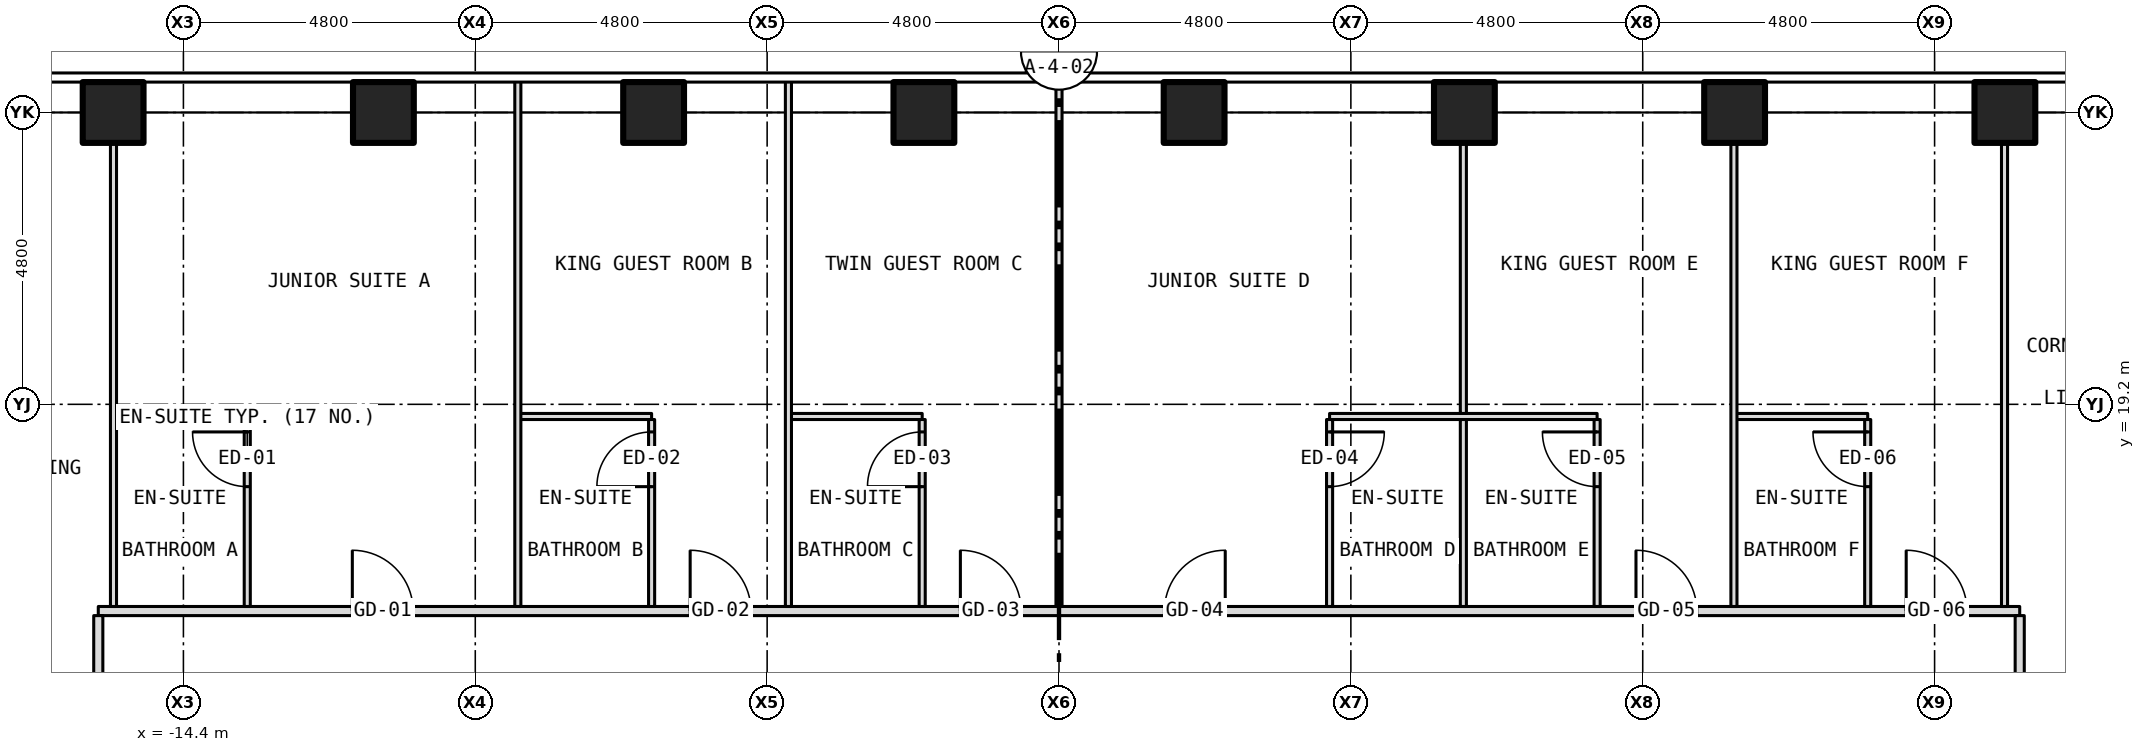
"""IFC4 building model, lengths in metres.
Left out: names, types, materials, properties, quantities, classifications, styles, units other than length and angle.
Written with IfcOpenShell. Run it as: python <this file> out.ifc"""

import sys

from ifc_helpers import new_model, si_unit, direction, frame, frame_2d, origin, origin_2d, place, context, subcontext, project, spatial, rectangle, hollow_rectangle, extrude, element, fill, save


model = new_model("IFC4")
c1 = context("Model", 3, precision=1e-05, world=origin(), true_north=direction((0.0, 1.0)))
c2 = subcontext(c1, "Body", "Model", "MODEL_VIEW")
j1 = project(units=[si_unit("LENGTHUNIT", "METRE"), si_unit("PLANEANGLEUNIT", "RADIAN")], contexts=[c1])
p1 = place(None, origin())
s1 = spatial("IfcSite", under=j1, at=p1, CompositionType="ELEMENT")
p2 = place(p1, origin())
s2 = spatial("IfcBuilding", under=s1, at=p2, CompositionType="ELEMENT")
p3 = place(p2, frame((0.0, 0.0, 53.0)))
s3 = spatial("IfcBuildingStorey", under=s2, at=p3, CompositionType="ELEMENT", Elevation=53.0)
for number, where, z_axis, x_axis in (
    (1, (-15.556, 24.0, -0.15), (0.0, 0.0, 1.0), (1.0, 0.0, 0.0)),
    (2, (-11.111, 24.0, -0.15), (0.0, 0.0, 1.0), (1.0, 0.0, 0.0)),
    (3, (-6.667, 24.0, -0.15), (0.0, 0.0, 1.0), (1.0, 0.0, 0.0)),
    (4, (-2.222, 24.0, -0.15), (0.0, 0.0, 1.0), (1.0, 0.0, 0.0)),
    (5, (2.222, 24.0, -0.15), (0.0, 0.0, 1.0), (1.0, 0.0, 0.0)),
    (6, (6.667, 24.0, -0.15), (0.0, 0.0, 1.0), (1.0, 0.0, 0.0)),
    (7, (11.111, 24.0, -0.15), (0.0, 0.0, 1.0), (1.0, 0.0, 0.0)),
    (8, (15.556, 24.0, -0.15), (0.0, 0.0, 1.0), (1.0, 0.0, 0.0)),
):
    element("IfcColumn", number, at=place(p3, frame(where, z_axis=z_axis, x_axis=x_axis)), inside=s3, PredefinedType="COLUMN", context=c2, shape_type="SweptSolid", body=[
        extrude(hollow_rectangle(XDim=1.0, YDim=1.0, WallThickness=0.06, at=origin_2d()), origin(), (0.0, 0.0, 1.0), 3.5),
    ])
p4 = place(p3, frame((-15.8, 15.8, 0.0), z_axis=(0.0, 0.0, 1.0), x_axis=(1.0, 0.0, 0.0)))
e9 = element("IfcWall", 9, at=p4, inside=s3, PredefinedType="PARTITIONING", context=c2, shape_type="SweptSolid", body=[
    extrude(rectangle(XDim=31.6, YDim=0.15, at=frame_2d((15.8, 0.0))), origin(), (0.0, 0.0, 1.0), 3.35),
])
p5 = place(p4, frame((4.178, 0.0, 0.0)))
e10 = element("IfcOpeningElement", 10, at=p5, cuts=e9, PredefinedType="OPENING", context=c2, shape_type="SweptSolid", body=[
    extrude(rectangle(XDim=1.0, YDim=2.1, at=frame_2d((0.5, 1.05))), frame((0.0, 0.087, 0.0), z_axis=(0.0, -1.0, 0.0), x_axis=(1.0, 0.0, 0.0)), (0.0, 0.0, 1.0), 0.174),
])
p6 = place(p4, frame((9.734, 0.0, 0.0)))
e11 = element("IfcOpeningElement", 11, at=p6, cuts=e9, PredefinedType="OPENING", context=c2, shape_type="SweptSolid", body=[
    extrude(rectangle(XDim=1.0, YDim=2.1, at=frame_2d((0.5, 1.05))), frame((0.0, 0.087, 0.0), z_axis=(0.0, -1.0, 0.0), x_axis=(1.0, 0.0, 0.0)), (0.0, 0.0, 1.0), 0.174),
])
p7 = place(p4, frame((14.178, 0.0, 0.0)))
e12 = element("IfcOpeningElement", 12, at=p7, cuts=e9, PredefinedType="OPENING", context=c2, shape_type="SweptSolid", body=[
    extrude(rectangle(XDim=1.0, YDim=2.1, at=frame_2d((0.5, 1.05))), frame((0.0, 0.087, 0.0), z_axis=(0.0, -1.0, 0.0), x_axis=(1.0, 0.0, 0.0)), (0.0, 0.0, 1.0), 0.174),
])
p8 = place(p4, frame((17.534, 0.0, 0.0)))
e13 = element("IfcOpeningElement", 13, at=p8, cuts=e9, PredefinedType="OPENING", context=c2, shape_type="SweptSolid", body=[
    extrude(rectangle(XDim=1.0, YDim=2.1, at=frame_2d((0.5, 1.05))), frame((0.0, 0.087, 0.0), z_axis=(0.0, -1.0, 0.0), x_axis=(1.0, 0.0, 0.0)), (0.0, 0.0, 1.0), 0.174),
])
p9 = place(p4, frame((25.289, 0.0, 0.0)))
e14 = element("IfcOpeningElement", 14, at=p9, cuts=e9, PredefinedType="OPENING", context=c2, shape_type="SweptSolid", body=[
    extrude(rectangle(XDim=1.0, YDim=2.1, at=frame_2d((0.5, 1.05))), frame((0.0, 0.087, 0.0), z_axis=(0.0, -1.0, 0.0), x_axis=(1.0, 0.0, 0.0)), (0.0, 0.0, 1.0), 0.174),
])
p10 = place(p4, frame((29.733, 0.0, 0.0)))
e15 = element("IfcOpeningElement", 15, at=p10, cuts=e9, PredefinedType="OPENING", context=c2, shape_type="SweptSolid", body=[
    extrude(rectangle(XDim=1.0, YDim=2.1, at=frame_2d((0.5, 1.05))), frame((0.0, 0.087, 0.0), z_axis=(0.0, -1.0, 0.0), x_axis=(1.0, 0.0, 0.0)), (0.0, 0.0, 1.0), 0.174),
])
for number, where, z_axis, x_axis in (
    (16, (-15.55, 19.0, 0.0), (0.0, 0.0, 1.0), (1.0, 0.0, 0.0)),
    (17, (-8.9, 19.0, 0.0), (0.0, 0.0, 1.0), (1.0, 0.0, 0.0)),
    (18, (-4.45, 19.0, 0.0), (0.0, 0.0, 1.0), (1.0, 0.0, 0.0)),
):
    element("IfcWall", number, at=place(p3, frame(where, z_axis=z_axis, x_axis=x_axis)), inside=s3, PredefinedType="PARTITIONING", context=c2, shape_type="SweptSolid", body=[
        extrude(rectangle(XDim=2.2, YDim=0.1, at=frame_2d((1.1, 0.0))), origin(), (0.0, 0.0, 1.0), 3.35),
    ])
p11 = place(p3, frame((4.45, 19.0, 0.0), z_axis=(0.0, 0.0, 1.0), x_axis=(1.0, 0.0, 0.0)))
e19 = element("IfcWall", 19, at=p11, inside=s3, PredefinedType="PARTITIONING", context=c2, shape_type="SweptSolid", body=[
    extrude(rectangle(XDim=4.4, YDim=0.1, at=frame_2d((2.2, 0.0))), origin(), (0.0, 0.0, 1.0), 3.35),
])
p12 = place(p3, frame((11.1, 19.0, 0.0), z_axis=(0.0, 0.0, 1.0), x_axis=(1.0, 0.0, 0.0)))
e20 = element("IfcWall", 20, at=p12, inside=s3, PredefinedType="PARTITIONING", context=c2, shape_type="SweptSolid", body=[
    extrude(rectangle(XDim=2.2, YDim=0.1, at=frame_2d((1.1, 0.0))), origin(), (0.0, 0.0, 1.0), 3.35),
])
p13 = place(p3, frame((-15.8, 10.92, 0.0), z_axis=(0.0, 0.0, 1.0), x_axis=(0.0, 1.0, 0.0)))
e21 = element("IfcWall", 21, at=p13, inside=s3, PredefinedType="PARTITIONING", context=c2, shape_type="SweptSolid", body=[
    extrude(rectangle(XDim=4.805, YDim=0.15, at=frame_2d((2.403, 0.0))), origin(), (0.0, 0.0, 1.0), 3.35),
])
p14 = place(p13, frame((0.78, 0.0, 0.0)))
e22 = element("IfcOpeningElement", 22, at=p14, cuts=e21, PredefinedType="OPENING", context=c2, shape_type="SweptSolid", body=[
    extrude(rectangle(XDim=1.0, YDim=2.1, at=frame_2d((0.5, 1.05))), frame((0.0, 0.087, 0.0), z_axis=(0.0, -1.0, 0.0), x_axis=(1.0, 0.0, 0.0)), (0.0, 0.0, 1.0), 0.174),
])
p15 = place(p3, frame((-15.55, 15.875, 0.0), z_axis=(0.0, 0.0, 1.0), x_axis=(0.0, 1.0, 0.0)))
e23 = element("IfcWall", 23, at=p15, inside=s3, PredefinedType="PARTITIONING", context=c2, shape_type="SweptSolid", body=[
    extrude(rectangle(XDim=8.005, YDim=0.1, at=frame_2d((4.002, 0.0))), origin(), (0.0, 0.0, 1.0), 3.35),
])
p16 = place(p3, frame((-13.35, 15.875, 0.0), z_axis=(0.0, 0.0, 1.0), x_axis=(0.0, 1.0, 0.0)))
e24 = element("IfcWall", 24, at=p16, inside=s3, PredefinedType="PARTITIONING", context=c2, shape_type="SweptSolid", body=[
    extrude(rectangle(XDim=3.075, YDim=0.1, at=frame_2d((1.538, 0.0))), origin(), (0.0, 0.0, 1.0), 3.35),
])
p17 = place(p16, frame((1.971, 0.0, 0.0)))
e25 = element("IfcOpeningElement", 25, at=p17, cuts=e24, PredefinedType="OPENING", context=c2, shape_type="SweptSolid", body=[
    extrude(rectangle(XDim=0.9, YDim=2.1, at=frame_2d((0.45, 1.05))), frame((0.0, 0.062, 0.0), z_axis=(0.0, -1.0, 0.0), x_axis=(1.0, 0.0, 0.0)), (0.0, 0.0, 1.0), 0.124),
])
p18 = place(p3, frame((-8.9, 15.875, 0.0), z_axis=(0.0, 0.0, 1.0), x_axis=(0.0, 1.0, 0.0)))
e26 = element("IfcWall", 26, at=p18, inside=s3, PredefinedType="PARTITIONING", context=c2, shape_type="SweptSolid", body=[
    extrude(rectangle(XDim=8.655, YDim=0.1, at=frame_2d((4.328, 0.0))), origin(), (0.0, 0.0, 1.0), 3.35),
])
p19 = place(p3, frame((-6.7, 15.875, 0.0), z_axis=(0.0, 0.0, 1.0), x_axis=(0.0, 1.0, 0.0)))
e27 = element("IfcWall", 27, at=p19, inside=s3, PredefinedType="PARTITIONING", context=c2, shape_type="SweptSolid", body=[
    extrude(rectangle(XDim=3.075, YDim=0.1, at=frame_2d((1.538, 0.0))), origin(), (0.0, 0.0, 1.0), 3.35),
])
p20 = place(p19, frame((1.971, 0.0, 0.0)))
e28 = element("IfcOpeningElement", 28, at=p20, cuts=e27, PredefinedType="OPENING", context=c2, shape_type="SweptSolid", body=[
    extrude(rectangle(XDim=0.9, YDim=2.1, at=frame_2d((0.45, 1.05))), frame((0.0, 0.062, 0.0), z_axis=(0.0, -1.0, 0.0), x_axis=(1.0, 0.0, 0.0)), (0.0, 0.0, 1.0), 0.124),
])
p21 = place(p3, frame((-4.45, 15.875, 0.0), z_axis=(0.0, 0.0, 1.0), x_axis=(0.0, 1.0, 0.0)))
e29 = element("IfcWall", 29, at=p21, inside=s3, PredefinedType="PARTITIONING", context=c2, shape_type="SweptSolid", body=[
    extrude(rectangle(XDim=8.655, YDim=0.1, at=frame_2d((4.328, 0.0))), origin(), (0.0, 0.0, 1.0), 3.35),
])
p22 = place(p3, frame((-2.25, 15.875, 0.0), z_axis=(0.0, 0.0, 1.0), x_axis=(0.0, 1.0, 0.0)))
e30 = element("IfcWall", 30, at=p22, inside=s3, PredefinedType="PARTITIONING", context=c2, shape_type="SweptSolid", body=[
    extrude(rectangle(XDim=3.075, YDim=0.1, at=frame_2d((1.538, 0.0))), origin(), (0.0, 0.0, 1.0), 3.35),
])
p23 = place(p22, frame((1.971, 0.0, 0.0)))
e31 = element("IfcOpeningElement", 31, at=p23, cuts=e30, PredefinedType="OPENING", context=c2, shape_type="SweptSolid", body=[
    extrude(rectangle(XDim=0.9, YDim=2.1, at=frame_2d((0.45, 1.05))), frame((0.0, 0.062, 0.0), z_axis=(0.0, -1.0, 0.0), x_axis=(1.0, 0.0, 0.0)), (0.0, 0.0, 1.0), 0.124),
])
p24 = place(p3, frame((0.0, 15.875, 0.0), z_axis=(0.0, 0.0, 1.0), x_axis=(0.0, 1.0, 0.0)))
e32 = element("IfcWall", 32, at=p24, inside=s3, PredefinedType="PARTITIONING", context=c2, shape_type="SweptSolid", body=[
    extrude(rectangle(XDim=8.655, YDim=0.1, at=frame_2d((4.328, 0.0))), origin(), (0.0, 0.0, 1.0), 2.728),
])
p25 = place(p3, frame((4.45, 15.875, 0.0), z_axis=(0.0, 0.0, 1.0), x_axis=(0.0, 1.0, 0.0)))
e33 = element("IfcWall", 33, at=p25, inside=s3, PredefinedType="PARTITIONING", context=c2, shape_type="SweptSolid", body=[
    extrude(rectangle(XDim=3.075, YDim=0.1, at=frame_2d((1.538, 0.0))), origin(), (0.0, 0.0, 1.0), 3.35),
])
p26 = place(p25, frame((1.971, 0.0, 0.0)))
e34 = element("IfcOpeningElement", 34, at=p26, cuts=e33, PredefinedType="OPENING", context=c2, shape_type="SweptSolid", body=[
    extrude(rectangle(XDim=0.9, YDim=2.1, at=frame_2d((0.45, 1.05))), frame((0.0, 0.062, 0.0), z_axis=(0.0, -1.0, 0.0), x_axis=(1.0, 0.0, 0.0)), (0.0, 0.0, 1.0), 0.124),
])
p27 = place(p3, frame((6.65, 15.875, 0.0), z_axis=(0.0, 0.0, 1.0), x_axis=(0.0, 1.0, 0.0)))
e35 = element("IfcWall", 35, at=p27, inside=s3, PredefinedType="PARTITIONING", context=c2, shape_type="SweptSolid", body=[
    extrude(rectangle(XDim=3.075, YDim=0.1, at=frame_2d((1.538, 0.0))), origin(), (0.0, 0.0, 1.0), 3.35),
])
p28 = place(p3, frame((6.65, 19.05, 0.0), z_axis=(0.0, 0.0, 1.0), x_axis=(0.0, 1.0, 0.0)))
e36 = element("IfcWall", 36, at=p28, inside=s3, PredefinedType="PARTITIONING", context=c2, shape_type="SweptSolid", body=[
    extrude(rectangle(XDim=4.83, YDim=0.1, at=frame_2d((2.415, 0.0))), origin(), (0.0, 0.0, 1.0), 3.35),
])
p29 = place(p3, frame((8.85, 15.875, 0.0), z_axis=(0.0, 0.0, 1.0), x_axis=(0.0, 1.0, 0.0)))
e37 = element("IfcWall", 37, at=p29, inside=s3, PredefinedType="PARTITIONING", context=c2, shape_type="SweptSolid", body=[
    extrude(rectangle(XDim=3.075, YDim=0.1, at=frame_2d((1.538, 0.0))), origin(), (0.0, 0.0, 1.0), 3.35),
])
p30 = place(p29, frame((1.971, 0.0, 0.0)))
e38 = element("IfcOpeningElement", 38, at=p30, cuts=e37, PredefinedType="OPENING", context=c2, shape_type="SweptSolid", body=[
    extrude(rectangle(XDim=0.9, YDim=2.1, at=frame_2d((0.45, 1.05))), frame((0.0, 0.062, 0.0), z_axis=(0.0, -1.0, 0.0), x_axis=(1.0, 0.0, 0.0)), (0.0, 0.0, 1.0), 0.124),
])
p31 = place(p3, frame((11.1, 15.875, 0.0), z_axis=(0.0, 0.0, 1.0), x_axis=(0.0, 1.0, 0.0)))
e39 = element("IfcWall", 39, at=p31, inside=s3, PredefinedType="PARTITIONING", context=c2, shape_type="SweptSolid", body=[
    extrude(rectangle(XDim=8.005, YDim=0.1, at=frame_2d((4.002, 0.0))), origin(), (0.0, 0.0, 1.0), 3.35),
])
p32 = place(p3, frame((13.3, 15.875, 0.0), z_axis=(0.0, 0.0, 1.0), x_axis=(0.0, 1.0, 0.0)))
e40 = element("IfcWall", 40, at=p32, inside=s3, PredefinedType="PARTITIONING", context=c2, shape_type="SweptSolid", body=[
    extrude(rectangle(XDim=3.075, YDim=0.1, at=frame_2d((1.538, 0.0))), origin(), (0.0, 0.0, 1.0), 3.35),
])
p33 = place(p32, frame((1.971, 0.0, 0.0)))
e41 = element("IfcOpeningElement", 41, at=p33, cuts=e40, PredefinedType="OPENING", context=c2, shape_type="SweptSolid", body=[
    extrude(rectangle(XDim=0.9, YDim=2.1, at=frame_2d((0.45, 1.05))), frame((0.0, 0.062, 0.0), z_axis=(0.0, -1.0, 0.0), x_axis=(1.0, 0.0, 0.0)), (0.0, 0.0, 1.0), 0.124),
])
p34 = place(p3, frame((15.55, 15.875, 0.0), z_axis=(0.0, 0.0, 1.0), x_axis=(0.0, 1.0, 0.0)))
e42 = element("IfcWall", 42, at=p34, inside=s3, PredefinedType="PARTITIONING", context=c2, shape_type="SweptSolid", body=[
    extrude(rectangle(XDim=8.005, YDim=0.1, at=frame_2d((4.002, 0.0))), origin(), (0.0, 0.0, 1.0), 3.35),
])
p35 = place(p3, frame((15.8, 10.92, 0.0), z_axis=(0.0, 0.0, 1.0), x_axis=(0.0, 1.0, 0.0)))
e43 = element("IfcWall", 43, at=p35, inside=s3, PredefinedType="PARTITIONING", context=c2, shape_type="SweptSolid", body=[
    extrude(rectangle(XDim=4.805, YDim=0.15, at=frame_2d((2.403, 0.0))), origin(), (0.0, 0.0, 1.0), 3.35),
])
p36 = place(p35, frame((0.78, 0.0, 0.0)))
e44 = element("IfcOpeningElement", 44, at=p36, cuts=e43, PredefinedType="OPENING", context=c2, shape_type="SweptSolid", body=[
    extrude(rectangle(XDim=1.0, YDim=2.1, at=frame_2d((0.5, 1.05))), frame((0.0, 0.087, 0.0), z_axis=(0.0, -1.0, 0.0), x_axis=(1.0, 0.0, 0.0)), (0.0, 0.0, 1.0), 0.174),
])
p37 = place(p5, origin())
e45 = element("IfcDoor", 45, at=p37, inside=s3, OperationType="SINGLE_SWING_LEFT", PredefinedType="DOOR", context=c2, shape_type="SweptSolid", body=[
    extrude(rectangle(XDim=1.0, YDim=2.1, at=frame_2d((0.5, 1.05))), frame((0.0, 0.025, 0.0), z_axis=(0.0, -1.0, 0.0), x_axis=(1.0, 0.0, 0.0)), (0.0, 0.0, 1.0), 0.05),
])
fill(e10, e45)
p38 = place(p17, origin())
e46 = element("IfcDoor", 46, at=p38, inside=s3, OperationType="SINGLE_SWING_RIGHT", PredefinedType="DOOR", context=c2, shape_type="SweptSolid", body=[
    extrude(rectangle(XDim=0.9, YDim=2.1, at=frame_2d((0.45, 1.05))), frame((0.0, 0.025, 0.0), z_axis=(0.0, -1.0, 0.0), x_axis=(1.0, 0.0, 0.0)), (0.0, 0.0, 1.0), 0.05),
])
fill(e25, e46)
p39 = place(p6, origin())
e47 = element("IfcDoor", 47, at=p39, inside=s3, OperationType="SINGLE_SWING_LEFT", PredefinedType="DOOR", context=c2, shape_type="SweptSolid", body=[
    extrude(rectangle(XDim=1.0, YDim=2.1, at=frame_2d((0.5, 1.05))), frame((0.0, 0.025, 0.0), z_axis=(0.0, -1.0, 0.0), x_axis=(1.0, 0.0, 0.0)), (0.0, 0.0, 1.0), 0.05),
])
fill(e11, e47)
p40 = place(p20, origin())
e48 = element("IfcDoor", 48, at=p40, inside=s3, OperationType="SINGLE_SWING_LEFT", PredefinedType="DOOR", context=c2, shape_type="SweptSolid", body=[
    extrude(rectangle(XDim=0.9, YDim=2.1, at=frame_2d((0.45, 1.05))), frame((0.0, 0.025, 0.0), z_axis=(0.0, -1.0, 0.0), x_axis=(1.0, 0.0, 0.0)), (0.0, 0.0, 1.0), 0.05),
])
fill(e28, e48)
p41 = place(p7, origin())
e49 = element("IfcDoor", 49, at=p41, inside=s3, OperationType="SINGLE_SWING_LEFT", PredefinedType="DOOR", context=c2, shape_type="SweptSolid", body=[
    extrude(rectangle(XDim=1.0, YDim=2.1, at=frame_2d((0.5, 1.05))), frame((0.0, 0.025, 0.0), z_axis=(0.0, -1.0, 0.0), x_axis=(1.0, 0.0, 0.0)), (0.0, 0.0, 1.0), 0.05),
])
fill(e12, e49)
p42 = place(p23, origin())
e50 = element("IfcDoor", 50, at=p42, inside=s3, OperationType="SINGLE_SWING_LEFT", PredefinedType="DOOR", context=c2, shape_type="SweptSolid", body=[
    extrude(rectangle(XDim=0.9, YDim=2.1, at=frame_2d((0.45, 1.05))), frame((0.0, 0.025, 0.0), z_axis=(0.0, -1.0, 0.0), x_axis=(1.0, 0.0, 0.0)), (0.0, 0.0, 1.0), 0.05),
])
fill(e31, e50)
p43 = place(p8, origin())
e51 = element("IfcDoor", 51, at=p43, inside=s3, OperationType="SINGLE_SWING_RIGHT", PredefinedType="DOOR", context=c2, shape_type="SweptSolid", body=[
    extrude(rectangle(XDim=1.0, YDim=2.1, at=frame_2d((0.5, 1.05))), frame((0.0, 0.025, 0.0), z_axis=(0.0, -1.0, 0.0), x_axis=(1.0, 0.0, 0.0)), (0.0, 0.0, 1.0), 0.05),
])
fill(e13, e51)
p44 = place(p26, origin())
e52 = element("IfcDoor", 52, at=p44, inside=s3, OperationType="SINGLE_SWING_RIGHT", PredefinedType="DOOR", context=c2, shape_type="SweptSolid", body=[
    extrude(rectangle(XDim=0.9, YDim=2.1, at=frame_2d((0.45, 1.05))), frame((0.0, 0.025, 0.0), z_axis=(0.0, -1.0, 0.0), x_axis=(1.0, 0.0, 0.0)), (0.0, 0.0, 1.0), 0.05),
])
fill(e34, e52)
p45 = place(p9, origin())
e53 = element("IfcDoor", 53, at=p45, inside=s3, OperationType="SINGLE_SWING_LEFT", PredefinedType="DOOR", context=c2, shape_type="SweptSolid", body=[
    extrude(rectangle(XDim=1.0, YDim=2.1, at=frame_2d((0.5, 1.05))), frame((0.0, 0.025, 0.0), z_axis=(0.0, -1.0, 0.0), x_axis=(1.0, 0.0, 0.0)), (0.0, 0.0, 1.0), 0.05),
])
fill(e14, e53)
p46 = place(p30, origin())
e54 = element("IfcDoor", 54, at=p46, inside=s3, OperationType="SINGLE_SWING_RIGHT", PredefinedType="DOOR", context=c2, shape_type="SweptSolid", body=[
    extrude(rectangle(XDim=0.9, YDim=2.1, at=frame_2d((0.45, 1.05))), frame((0.0, 0.025, 0.0), z_axis=(0.0, -1.0, 0.0), x_axis=(1.0, 0.0, 0.0)), (0.0, 0.0, 1.0), 0.05),
])
fill(e38, e54)
p47 = place(p10, origin())
e55 = element("IfcDoor", 55, at=p47, inside=s3, OperationType="SINGLE_SWING_LEFT", PredefinedType="DOOR", context=c2, shape_type="SweptSolid", body=[
    extrude(rectangle(XDim=1.0, YDim=2.1, at=frame_2d((0.5, 1.05))), frame((0.0, 0.025, 0.0), z_axis=(0.0, -1.0, 0.0), x_axis=(1.0, 0.0, 0.0)), (0.0, 0.0, 1.0), 0.05),
])
fill(e15, e55)
p48 = place(p33, origin())
e56 = element("IfcDoor", 56, at=p48, inside=s3, OperationType="SINGLE_SWING_RIGHT", PredefinedType="DOOR", context=c2, shape_type="SweptSolid", body=[
    extrude(rectangle(XDim=0.9, YDim=2.1, at=frame_2d((0.45, 1.05))), frame((0.0, 0.025, 0.0), z_axis=(0.0, -1.0, 0.0), x_axis=(1.0, 0.0, 0.0)), (0.0, 0.0, 1.0), 0.05),
])
fill(e41, e56)
save(model, sys.argv[1])
